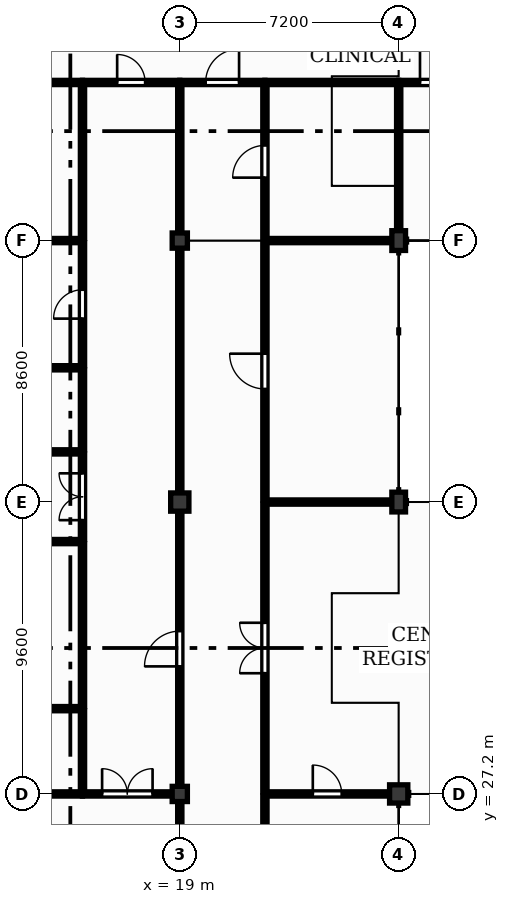
"""IFC4 building model, lengths in metres.
Left out: names, types, materials, properties, quantities, classifications, styles, units other than length and angle.
Written with IfcOpenShell. Run it as: python <this file> out.ifc"""

import sys

from ifc_helpers import new_model, si_unit, direction, frame, frame_2d, origin, origin_2d, place, context, subcontext, project, spatial, rectangle, extrude, element, fill, save


model = new_model("IFC4")
c1 = context("Model", 3, precision=1e-05, world=origin(), true_north=direction((0.0, 1.0)))
c2 = subcontext(c1, "Body", "Model", "MODEL_VIEW")
j1 = project(units=[si_unit("LENGTHUNIT", "METRE"), si_unit("PLANEANGLEUNIT", "RADIAN")], contexts=[c1])
p1 = place(None, origin())
s1 = spatial("IfcSite", under=j1, at=p1, CompositionType="ELEMENT")
p2 = place(p1, origin())
s2 = spatial("IfcBuilding", under=s1, at=p2, CompositionType="ELEMENT")
p3 = place(p2, origin())
s3 = spatial("IfcBuildingStorey", under=s2, at=p3, CompositionType="ELEMENT", Elevation=0.0)
p4 = place(p3, frame((19.0, 27.2, 0.0), z_axis=(0.0, 0.0, 1.0), x_axis=(1.0, 0.0, 0.0)))
e1 = element("IfcColumn", 1, at=p4, inside=s3, PredefinedType="COLUMN", context=c2, shape_type="SweptSolid", body=[
    extrude(rectangle(XDim=0.5, YDim=0.5, at=origin_2d()), origin(), (0.0, 0.0, 1.0), 4.2),
])
p5 = place(p3, frame((19.0, 36.8, 0.0), z_axis=(0.0, 0.0, 1.0), x_axis=(1.0, 0.0, 0.0)))
e2 = element("IfcColumn", 2, at=p5, inside=s3, PredefinedType="COLUMN", context=c2, shape_type="SweptSolid", body=[
    extrude(rectangle(XDim=0.6, YDim=0.6, at=origin_2d()), origin(), (0.0, 0.0, 1.0), 4.2),
])
p6 = place(p3, frame((19.0, 45.4, 0.0), z_axis=(0.0, 0.0, 1.0), x_axis=(1.0, 0.0, 0.0)))
e3 = element("IfcColumn", 3, at=p6, inside=s3, PredefinedType="COLUMN", context=c2, shape_type="SweptSolid", body=[
    extrude(rectangle(XDim=0.5, YDim=0.5, at=origin_2d()), origin(), (0.0, 0.0, 1.0), 4.2),
])
p7 = place(p3, frame((26.2, 27.2, 0.0), z_axis=(0.0, 0.0, 1.0), x_axis=(1.0, 0.0, 0.0)))
e4 = element("IfcColumn", 4, at=p7, inside=s3, PredefinedType="COLUMN", context=c2, shape_type="SweptSolid", body=[
    extrude(rectangle(XDim=0.6, YDim=0.6, at=origin_2d()), origin(), (0.0, 0.0, 1.0), 4.2),
])
for number, where, z_axis, x_axis in (
    (5, (26.2, 36.8, 0.0), (0.0, 0.0, 1.0), (1.0, 0.0, 0.0)),
    (6, (26.2, 45.4, 0.0), (0.0, 0.0, 1.0), (1.0, 0.0, 0.0)),
):
    element("IfcColumn", number, at=place(p3, frame(where, z_axis=z_axis, x_axis=x_axis)), inside=s3, PredefinedType="COLUMN", context=c2, shape_type="SweptSolid", body=[
        extrude(rectangle(XDim=0.45, YDim=0.65, at=origin_2d()), origin(), (0.0, 0.0, 1.0), 4.2),
    ])
p8 = place(p3, frame((12.025, 27.2, 0.0), z_axis=(0.0, 0.0, 1.0), x_axis=(1.0, 0.0, 0.0)))
e7 = element("IfcWall", 7, at=p8, inside=s3, PredefinedType="PARTITIONING", context=c2, shape_type="SweptSolid", body=[
    extrude(rectangle(XDim=3.775, YDim=0.14, at=frame_2d((1.888, 0.0))), origin(), (0.0, 0.0, 1.0), 3.68),
])
p9 = place(p8, frame((1.357, 0.0, 0.0)))
e8 = element("IfcOpeningElement", 8, at=p9, cuts=e7, PredefinedType="OPENING", context=c2, shape_type="SweptSolid", body=[
    extrude(rectangle(XDim=1.06, YDim=2.15, at=frame_2d((0.53, 1.075))), frame((0.0, 0.08, 0.0), z_axis=(0.0, -1.0, 0.0), x_axis=(1.0, 0.0, 0.0)), (0.0, 0.0, 1.0), 0.16),
])
p10 = place(p3, frame((11.8, 30.005, 0.0), z_axis=(0.0, 0.0, 1.0), x_axis=(1.0, 0.0, 0.0)))
e9 = element("IfcWall", 9, at=p10, inside=s3, PredefinedType="PARTITIONING", context=c2, shape_type="SweptSolid", body=[
    extrude(rectangle(XDim=4.0, YDim=0.14, at=frame_2d((2.0, 0.0))), origin(), (0.0, 0.0, 1.0), 4.18),
])
p11 = place(p3, frame((11.8, 35.5, 0.0), z_axis=(0.0, 0.0, 1.0), x_axis=(1.0, 0.0, 0.0)))
e10 = element("IfcWall", 10, at=p11, inside=s3, PredefinedType="PARTITIONING", context=c2, shape_type="SweptSolid", body=[
    extrude(rectangle(XDim=4.0, YDim=0.14, at=frame_2d((2.0, 0.0))), origin(), (0.0, 0.0, 1.0), 4.18),
])
p12 = place(p11, frame((1.23, 0.0, 0.0)))
e11 = element("IfcOpeningElement", 11, at=p12, cuts=e10, PredefinedType="OPENING", context=c2, shape_type="SweptSolid", body=[
    extrude(rectangle(XDim=1.54, YDim=2.25, at=frame_2d((0.77, 1.125))), frame((0.0, 0.08, 0.0), z_axis=(0.0, -1.0, 0.0), x_axis=(1.0, 0.0, 0.0)), (0.0, 0.0, 1.0), 0.16),
])
p13 = place(p3, frame((11.8, 38.45, 0.0), z_axis=(0.0, 0.0, 1.0), x_axis=(1.0, 0.0, 0.0)))
e12 = element("IfcWall", 12, at=p13, inside=s3, PredefinedType="PARTITIONING", context=c2, shape_type="SweptSolid", body=[
    extrude(rectangle(XDim=4.0, YDim=0.14, at=frame_2d((2.0, 0.0))), origin(), (0.0, 0.0, 1.0), 4.18),
])
p14 = place(p13, frame((1.39, 0.0, 0.0)))
e13 = element("IfcOpeningElement", 13, at=p14, cuts=e12, PredefinedType="OPENING", context=c2, shape_type="SweptSolid", body=[
    extrude(rectangle(XDim=1.22, YDim=2.1, at=frame_2d((0.61, 1.05))), frame((0.0, 0.08, 0.0), z_axis=(0.0, -1.0, 0.0), x_axis=(1.0, 0.0, 0.0)), (0.0, 0.0, 1.0), 0.16),
])
p15 = place(p3, frame((11.8, 41.216, 0.0), z_axis=(0.0, 0.0, 1.0), x_axis=(1.0, 0.0, 0.0)))
e14 = element("IfcWall", 14, at=p15, inside=s3, PredefinedType="PARTITIONING", context=c2, shape_type="SweptSolid", body=[
    extrude(rectangle(XDim=4.0, YDim=0.14, at=frame_2d((2.0, 0.0))), origin(), (0.0, 0.0, 1.0), 4.18),
])
p16 = place(p3, frame((12.1, 45.4, 0.0), z_axis=(0.0, 0.0, 1.0), x_axis=(1.0, 0.0, 0.0)))
e15 = element("IfcWall", 15, at=p16, inside=s3, PredefinedType="PARTITIONING", context=c2, shape_type="SweptSolid", body=[
    extrude(rectangle(XDim=3.7, YDim=0.14, at=frame_2d((1.85, 0.0))), origin(), (0.0, 0.0, 1.0), 3.25),
])
p17 = place(p3, frame((11.8, 50.6, 0.0), z_axis=(0.0, 0.0, 1.0), x_axis=(1.0, 0.0, 0.0)))
e16 = element("IfcWall", 16, at=p17, inside=s3, PredefinedType="PARTITIONING", context=c2, shape_type="SweptSolid", body=[
    extrude(rectangle(XDim=4.0, YDim=0.14, at=frame_2d((2.0, 0.0))), origin(), (0.0, 0.0, 1.0), 4.18),
])
p18 = place(p17, frame((1.51, 0.0, 0.0)))
e17 = element("IfcOpeningElement", 17, at=p18, cuts=e16, PredefinedType="OPENING", context=c2, shape_type="SweptSolid", body=[
    extrude(rectangle(XDim=0.98, YDim=2.15, at=frame_2d((0.49, 1.075))), frame((0.0, 0.08, 0.0), z_axis=(0.0, -1.0, 0.0), x_axis=(1.0, 0.0, 0.0)), (0.0, 0.0, 1.0), 0.16),
])
p19 = place(p3, frame((15.8, 27.27, 0.0), z_axis=(0.0, 0.0, 1.0), x_axis=(0.0, 1.0, 0.0)))
e18 = element("IfcWall", 18, at=p19, inside=s3, PredefinedType="PARTITIONING", context=c2, shape_type="SweptSolid", body=[
    extrude(rectangle(XDim=2.665, YDim=0.14, at=frame_2d((1.333, 0.0))), origin(), (0.0, 0.0, 1.0), 4.18),
])
p20 = place(p3, frame((15.8, 27.2, 0.0), z_axis=(0.0, 0.0, 1.0), x_axis=(1.0, 0.0, 0.0)))
e19 = element("IfcWall", 19, at=p20, inside=s3, PredefinedType="PARTITIONING", context=c2, shape_type="SweptSolid", body=[
    extrude(rectangle(XDim=2.95, YDim=0.14, at=frame_2d((1.475, 0.0))), origin(), (0.0, 0.0, 1.0), 3.68),
])
p21 = place(p20, frame((0.645, 0.0, 0.0)))
e20 = element("IfcOpeningElement", 20, at=p21, cuts=e19, PredefinedType="OPENING", context=c2, shape_type="SweptSolid", body=[
    extrude(rectangle(XDim=1.66, YDim=2.3, at=frame_2d((0.83, 1.15))), frame((0.0, 0.08, 0.0), z_axis=(0.0, -1.0, 0.0), x_axis=(1.0, 0.0, 0.0)), (0.0, 0.0, 1.0), 0.16),
])
p22 = place(p3, frame((15.8, 30.075, 0.0), z_axis=(0.0, 0.0, 1.0), x_axis=(0.0, 1.0, 0.0)))
e21 = element("IfcWall", 21, at=p22, inside=s3, PredefinedType="PARTITIONING", context=c2, shape_type="SweptSolid", body=[
    extrude(rectangle(XDim=5.355, YDim=0.14, at=frame_2d((2.677, 0.0))), origin(), (0.0, 0.0, 1.0), 4.18),
])
p23 = place(p3, frame((15.8, 35.57, 0.0), z_axis=(0.0, 0.0, 1.0), x_axis=(0.0, 1.0, 0.0)))
e22 = element("IfcWall", 22, at=p23, inside=s3, PredefinedType="PARTITIONING", context=c2, shape_type="SweptSolid", body=[
    extrude(rectangle(XDim=2.81, YDim=0.14, at=frame_2d((1.405, 0.0))), origin(), (0.0, 0.0, 1.0), 4.18),
])
p24 = place(p23, frame((0.635, 0.0, 0.0)))
e23 = element("IfcOpeningElement", 23, at=p24, cuts=e22, PredefinedType="OPENING", context=c2, shape_type="SweptSolid", body=[
    extrude(rectangle(XDim=1.54, YDim=2.25, at=frame_2d((0.77, 1.125))), frame((0.0, 0.08, 0.0), z_axis=(0.0, -1.0, 0.0), x_axis=(1.0, 0.0, 0.0)), (0.0, 0.0, 1.0), 0.16),
])
p25 = place(p3, frame((15.8, 38.52, 0.0), z_axis=(0.0, 0.0, 1.0), x_axis=(0.0, 1.0, 0.0)))
e24 = element("IfcWall", 24, at=p25, inside=s3, PredefinedType="PARTITIONING", context=c2, shape_type="SweptSolid", body=[
    extrude(rectangle(XDim=2.626, YDim=0.14, at=frame_2d((1.313, 0.0))), origin(), (0.0, 0.0, 1.0), 4.18),
])
p26 = place(p3, frame((15.8, 41.286, 0.0), z_axis=(0.0, 0.0, 1.0), x_axis=(0.0, 1.0, 0.0)))
e25 = element("IfcWall", 25, at=p26, inside=s3, PredefinedType="PARTITIONING", context=c2, shape_type="SweptSolid", body=[
    extrude(rectangle(XDim=4.044, YDim=0.14, at=frame_2d((2.022, 0.0))), origin(), (0.0, 0.0, 1.0), 4.18),
])
p27 = place(p26, frame((1.547, 0.0, 0.0)))
e26 = element("IfcOpeningElement", 26, at=p27, cuts=e25, PredefinedType="OPENING", context=c2, shape_type="SweptSolid", body=[
    extrude(rectangle(XDim=0.95, YDim=2.1, at=frame_2d((0.475, 1.05))), frame((0.0, 0.08, 0.0), z_axis=(0.0, -1.0, 0.0), x_axis=(1.0, 0.0, 0.0)), (0.0, 0.0, 1.0), 0.16),
])
p28 = place(p3, frame((15.8, 45.47, 0.0), z_axis=(0.0, 0.0, 1.0), x_axis=(0.0, 1.0, 0.0)))
e27 = element("IfcWall", 27, at=p28, inside=s3, PredefinedType="PARTITIONING", context=c2, shape_type="SweptSolid", body=[
    extrude(rectangle(XDim=5.06, YDim=0.14, at=frame_2d((2.53, 0.0))), origin(), (0.0, 0.0, 1.0), 4.18),
])
p29 = place(p3, frame((15.8, 50.6, 0.0), z_axis=(0.0, 0.0, 1.0), x_axis=(1.0, 0.0, 0.0)))
e28 = element("IfcWall", 28, at=p29, inside=s3, PredefinedType="PARTITIONING", context=c2, shape_type="SweptSolid", body=[
    extrude(rectangle(XDim=3.2, YDim=0.14, at=frame_2d((1.6, 0.0))), origin(), (0.0, 0.0, 1.0), 4.18),
])
p30 = place(p29, frame((1.14, 0.0, 0.0)))
e29 = element("IfcOpeningElement", 29, at=p30, cuts=e28, PredefinedType="OPENING", context=c2, shape_type="SweptSolid", body=[
    extrude(rectangle(XDim=0.92, YDim=2.1, at=frame_2d((0.46, 1.05))), frame((0.0, 0.08, 0.0), z_axis=(0.0, -1.0, 0.0), x_axis=(1.0, 0.0, 0.0)), (0.0, 0.0, 1.0), 0.16),
])
p31 = place(p3, frame((19.0, 18.85, 0.0), z_axis=(0.0, 0.0, 1.0), x_axis=(0.0, 1.0, 0.0)))
e30 = element("IfcWall", 30, at=p31, inside=s3, PredefinedType="PARTITIONING", context=c2, shape_type="SweptSolid", body=[
    extrude(rectangle(XDim=8.1, YDim=0.14, at=frame_2d((4.05, 0.0))), origin(), (0.0, 0.0, 1.0), 3.68),
])
p32 = place(p31, frame((3.47, 0.0, 0.0)))
e31 = element("IfcOpeningElement", 31, at=p32, cuts=e30, PredefinedType="OPENING", context=c2, shape_type="SweptSolid", body=[
    extrude(rectangle(XDim=1.16, YDim=2.1, at=frame_2d((0.58, 1.05))), frame((0.0, 0.08, 0.0), z_axis=(0.0, -1.0, 0.0), x_axis=(1.0, 0.0, 0.0)), (0.0, 0.0, 1.0), 0.16),
])
p33 = place(p3, frame((19.0, 27.45, 0.0), z_axis=(0.0, 0.0, 1.0), x_axis=(0.0, 1.0, 0.0)))
e32 = element("IfcWall", 32, at=p33, inside=s3, PredefinedType="PARTITIONING", context=c2, shape_type="SweptSolid", body=[
    extrude(rectangle(XDim=9.05, YDim=0.14, at=frame_2d((4.525, 0.0))), origin(), (0.0, 0.0, 1.0), 3.4),
])
p34 = place(p33, frame((3.945, 0.0, 0.0)))
e33 = element("IfcOpeningElement", 33, at=p34, cuts=e32, PredefinedType="OPENING", context=c2, shape_type="SweptSolid", body=[
    extrude(rectangle(XDim=1.16, YDim=2.1, at=frame_2d((0.58, 1.05))), frame((0.0, 0.08, 0.0), z_axis=(0.0, -1.0, 0.0), x_axis=(1.0, 0.0, 0.0)), (0.0, 0.0, 1.0), 0.16),
])
p35 = place(p3, frame((19.0, 37.1, 0.0), z_axis=(0.0, 0.0, 1.0), x_axis=(0.0, 1.0, 0.0)))
e34 = element("IfcWall", 34, at=p35, inside=s3, PredefinedType="PARTITIONING", context=c2, shape_type="SweptSolid", body=[
    extrude(rectangle(XDim=8.05, YDim=0.14, at=frame_2d((4.025, 0.0))), origin(), (0.0, 0.0, 1.0), 3.4),
])
p36 = place(p3, frame((19.0, 45.65, 0.0), z_axis=(0.0, 0.0, 1.0), x_axis=(0.0, 1.0, 0.0)))
e35 = element("IfcWall", 35, at=p36, inside=s3, PredefinedType="PARTITIONING", context=c2, shape_type="SweptSolid", body=[
    extrude(rectangle(XDim=4.88, YDim=0.14, at=frame_2d((2.44, 0.0))), origin(), (0.0, 0.0, 1.0), 3.5),
])
p37 = place(p3, frame((19.0, 50.6, 0.0), z_axis=(0.0, 0.0, 1.0), x_axis=(1.0, 0.0, 0.0)))
e36 = element("IfcWall", 36, at=p37, inside=s3, PredefinedType="PARTITIONING", context=c2, shape_type="SweptSolid", body=[
    extrude(rectangle(XDim=2.8, YDim=0.14, at=frame_2d((1.4, 0.0))), origin(), (0.0, 0.0, 1.0), 4.18),
])
p38 = place(p37, frame((0.85, 0.0, 0.0)))
e37 = element("IfcOpeningElement", 37, at=p38, cuts=e36, PredefinedType="OPENING", context=c2, shape_type="SweptSolid", body=[
    extrude(rectangle(XDim=1.1, YDim=2.1, at=frame_2d((0.55, 1.05))), frame((0.0, 0.08, 0.0), z_axis=(0.0, -1.0, 0.0), x_axis=(1.0, 0.0, 0.0)), (0.0, 0.0, 1.0), 0.16),
])
p39 = place(p3, frame((21.8, 18.67, 0.0), z_axis=(0.0, 0.0, 1.0), x_axis=(0.0, 1.0, 0.0)))
e38 = element("IfcWall", 38, at=p39, inside=s3, PredefinedType="PARTITIONING", context=c2, shape_type="SweptSolid", body=[
    extrude(rectangle(XDim=8.46, YDim=0.14, at=frame_2d((4.23, 0.0))), origin(), (0.0, 0.0, 1.0), 4.18),
])
p40 = place(p39, frame((3.46, 0.0, 0.0)))
e39 = element("IfcOpeningElement", 39, at=p40, cuts=e38, PredefinedType="OPENING", context=c2, shape_type="SweptSolid", body=[
    extrude(rectangle(XDim=1.54, YDim=2.25, at=frame_2d((0.77, 1.125))), frame((0.0, 0.08, 0.0), z_axis=(0.0, -1.0, 0.0), x_axis=(1.0, 0.0, 0.0)), (0.0, 0.0, 1.0), 0.16),
])
p41 = place(p3, frame((21.8, 27.27, 0.0), z_axis=(0.0, 0.0, 1.0), x_axis=(0.0, 1.0, 0.0)))
e40 = element("IfcWall", 40, at=p41, inside=s3, PredefinedType="PARTITIONING", context=c2, shape_type="SweptSolid", body=[
    extrude(rectangle(XDim=9.46, YDim=0.14, at=frame_2d((4.73, 0.0))), origin(), (0.0, 0.0, 1.0), 4.18),
])
p42 = place(p41, frame((3.9, 0.0, 0.0)))
e41 = element("IfcOpeningElement", 41, at=p42, cuts=e40, PredefinedType="OPENING", context=c2, shape_type="SweptSolid", body=[
    extrude(rectangle(XDim=1.66, YDim=2.3, at=frame_2d((0.83, 1.15))), frame((0.0, 0.08, 0.0), z_axis=(0.0, -1.0, 0.0), x_axis=(1.0, 0.0, 0.0)), (0.0, 0.0, 1.0), 0.16),
])
p43 = place(p3, frame((21.8, 27.2, 0.0), z_axis=(0.0, 0.0, 1.0), x_axis=(1.0, 0.0, 0.0)))
e42 = element("IfcWall", 42, at=p43, inside=s3, PredefinedType="PARTITIONING", context=c2, shape_type="SweptSolid", body=[
    extrude(rectangle(XDim=4.1, YDim=0.14, at=frame_2d((2.05, 0.0))), origin(), (0.0, 0.0, 1.0), 3.6),
])
p44 = place(p43, frame((1.575, 0.0, 0.0)))
e43 = element("IfcOpeningElement", 43, at=p44, cuts=e42, PredefinedType="OPENING", context=c2, shape_type="SweptSolid", body=[
    extrude(rectangle(XDim=0.95, YDim=2.1, at=frame_2d((0.475, 1.05))), frame((0.0, 0.08, 0.0), z_axis=(0.0, -1.0, 0.0), x_axis=(1.0, 0.0, 0.0)), (0.0, 0.0, 1.0), 0.16),
])
p45 = place(p3, frame((21.8, 36.87, 0.0), z_axis=(0.0, 0.0, 1.0), x_axis=(0.0, 1.0, 0.0)))
e44 = element("IfcWall", 44, at=p45, inside=s3, PredefinedType="PARTITIONING", context=c2, shape_type="SweptSolid", body=[
    extrude(rectangle(XDim=8.46, YDim=0.14, at=frame_2d((4.23, 0.0))), origin(), (0.0, 0.0, 1.0), 4.18),
])
p46 = place(p45, frame((3.65, 0.0, 0.0)))
e45 = element("IfcOpeningElement", 45, at=p46, cuts=e44, PredefinedType="OPENING", context=c2, shape_type="SweptSolid", body=[
    extrude(rectangle(XDim=1.16, YDim=2.1, at=frame_2d((0.58, 1.05))), frame((0.0, 0.08, 0.0), z_axis=(0.0, -1.0, 0.0), x_axis=(1.0, 0.0, 0.0)), (0.0, 0.0, 1.0), 0.16),
])
p47 = place(p3, frame((21.8, 36.8, 0.0), z_axis=(0.0, 0.0, 1.0), x_axis=(1.0, 0.0, 0.0)))
e46 = element("IfcWall", 46, at=p47, inside=s3, PredefinedType="PARTITIONING", context=c2, shape_type="SweptSolid", body=[
    extrude(rectangle(XDim=4.175, YDim=0.14, at=frame_2d((2.087, 0.0))), origin(), (0.0, 0.0, 1.0), 3.5),
])
p48 = place(p3, frame((21.8, 45.47, 0.0), z_axis=(0.0, 0.0, 1.0), x_axis=(0.0, 1.0, 0.0)))
e47 = element("IfcWall", 47, at=p48, inside=s3, PredefinedType="PARTITIONING", context=c2, shape_type="SweptSolid", body=[
    extrude(rectangle(XDim=5.06, YDim=0.14, at=frame_2d((2.53, 0.0))), origin(), (0.0, 0.0, 1.0), 4.18),
])
p49 = place(p48, frame((2.0, 0.0, 0.0)))
e48 = element("IfcOpeningElement", 48, at=p49, cuts=e47, PredefinedType="OPENING", context=c2, shape_type="SweptSolid", body=[
    extrude(rectangle(XDim=1.06, YDim=2.15, at=frame_2d((0.53, 1.075))), frame((0.0, 0.08, 0.0), z_axis=(0.0, -1.0, 0.0), x_axis=(1.0, 0.0, 0.0)), (0.0, 0.0, 1.0), 0.16),
])
p50 = place(p3, frame((21.8, 45.4, 0.0), z_axis=(0.0, 0.0, 1.0), x_axis=(1.0, 0.0, 0.0)))
e49 = element("IfcWall", 49, at=p50, inside=s3, PredefinedType="PARTITIONING", context=c2, shape_type="SweptSolid", body=[
    extrude(rectangle(XDim=4.175, YDim=0.14, at=frame_2d((2.087, 0.0))), origin(), (0.0, 0.0, 1.0), 3.25),
])
p51 = place(p3, frame((21.8, 50.6, 0.0), z_axis=(0.0, 0.0, 1.0), x_axis=(1.0, 0.0, 0.0)))
e50 = element("IfcWall", 50, at=p51, inside=s3, PredefinedType="PARTITIONING", context=c2, shape_type="SweptSolid", body=[
    extrude(rectangle(XDim=4.4, YDim=0.14, at=frame_2d((2.2, 0.0))), origin(), (0.0, 0.0, 1.0), 4.18),
])
p52 = place(p3, frame((26.2, 45.725, 0.0), z_axis=(0.0, 0.0, 1.0), x_axis=(0.0, 1.0, 0.0)))
e51 = element("IfcWall", 51, at=p52, inside=s3, PredefinedType="PARTITIONING", context=c2, shape_type="SweptSolid", body=[
    extrude(rectangle(XDim=4.805, YDim=0.14, at=frame_2d((2.402, 0.0))), origin(), (0.0, 0.0, 1.0), 3.5),
])
p53 = place(p3, frame((26.2, 50.6, 0.0), z_axis=(0.0, 0.0, 1.0), x_axis=(1.0, 0.0, 0.0)))
e52 = element("IfcWall", 52, at=p53, inside=s3, PredefinedType="PARTITIONING", context=c2, shape_type="SweptSolid", body=[
    extrude(rectangle(XDim=2.621, YDim=0.14, at=frame_2d((1.311, 0.0))), origin(), (0.0, 0.0, 1.0), 4.18),
])
p54 = place(p53, frame((0.7, 0.0, 0.0)))
e53 = element("IfcOpeningElement", 53, at=p54, cuts=e52, PredefinedType="OPENING", context=c2, shape_type="SweptSolid", body=[
    extrude(rectangle(XDim=1.22, YDim=2.1, at=frame_2d((0.61, 1.05))), frame((0.0, 0.08, 0.0), z_axis=(0.0, -1.0, 0.0), x_axis=(1.0, 0.0, 0.0)), (0.0, 0.0, 1.0), 0.16),
])
p55 = place(p30, origin())
e54 = element("IfcDoor", 54, at=p55, inside=s3, OperationType="SINGLE_SWING_LEFT", PredefinedType="DOOR", context=c2, shape_type="SweptSolid", body=[
    extrude(rectangle(XDim=0.92, YDim=2.1, at=frame_2d((0.46, 1.05))), frame((0.0, 0.025, 0.0), z_axis=(0.0, -1.0, 0.0), x_axis=(1.0, 0.0, 0.0)), (0.0, 0.0, 1.0), 0.05),
])
fill(e29, e54)
p56 = place(p38, origin())
e55 = element("IfcDoor", 55, at=p56, inside=s3, OperationType="SINGLE_SWING_RIGHT", PredefinedType="DOOR", context=c2, shape_type="SweptSolid", body=[
    extrude(rectangle(XDim=1.1, YDim=2.1, at=frame_2d((0.55, 1.05))), frame((0.0, 0.025, 0.0), z_axis=(0.0, -1.0, 0.0), x_axis=(1.0, 0.0, 0.0)), (0.0, 0.0, 1.0), 0.05),
])
fill(e37, e55)
p57 = place(p24, origin())
e56 = element("IfcDoor", 56, at=p57, inside=s3, OperationType="DOUBLE_DOOR_SINGLE_SWING", PredefinedType="DOOR", context=c2, shape_type="SweptSolid", body=[
    extrude(rectangle(XDim=1.54, YDim=2.25, at=frame_2d((0.77, 1.125))), frame((0.0, 0.025, 0.0), z_axis=(0.0, -1.0, 0.0), x_axis=(1.0, 0.0, 0.0)), (0.0, 0.0, 1.0), 0.05),
])
fill(e23, e56)
p58 = place(p34, origin())
e57 = element("IfcDoor", 57, at=p58, inside=s3, OperationType="SINGLE_SWING_LEFT", PredefinedType="DOOR", context=c2, shape_type="SweptSolid", body=[
    extrude(rectangle(XDim=1.16, YDim=2.1, at=frame_2d((0.58, 1.05))), frame((0.0, 0.025, 0.0), z_axis=(0.0, -1.0, 0.0), x_axis=(1.0, 0.0, 0.0)), (0.0, 0.0, 1.0), 0.05),
])
fill(e33, e57)
p59 = place(p21, origin())
e58 = element("IfcDoor", 58, at=p59, inside=s3, OperationType="DOUBLE_DOOR_SINGLE_SWING", PredefinedType="DOOR", context=c2, shape_type="SweptSolid", body=[
    extrude(rectangle(XDim=1.66, YDim=2.3, at=frame_2d((0.83, 1.15))), frame((0.0, 0.025, 0.0), z_axis=(0.0, -1.0, 0.0), x_axis=(1.0, 0.0, 0.0)), (0.0, 0.0, 1.0), 0.05),
])
fill(e20, e58)
p60 = place(p42, origin())
e59 = element("IfcDoor", 59, at=p60, inside=s3, OperationType="DOUBLE_DOOR_SINGLE_SWING", PredefinedType="DOOR", context=c2, shape_type="SweptSolid", body=[
    extrude(rectangle(XDim=1.66, YDim=2.3, at=frame_2d((0.83, 1.15))), frame((0.0, 0.025, 0.0), z_axis=(0.0, -1.0, 0.0), x_axis=(1.0, 0.0, 0.0)), (0.0, 0.0, 1.0), 0.05),
])
fill(e41, e59)
p61 = place(p44, origin())
e60 = element("IfcDoor", 60, at=p61, inside=s3, OperationType="SINGLE_SWING_LEFT", PredefinedType="DOOR", context=c2, shape_type="SweptSolid", body=[
    extrude(rectangle(XDim=0.95, YDim=2.1, at=frame_2d((0.475, 1.05))), frame((0.0, 0.025, 0.0), z_axis=(0.0, -1.0, 0.0), x_axis=(1.0, 0.0, 0.0)), (0.0, 0.0, 1.0), 0.05),
])
fill(e43, e60)
p62 = place(p46, origin())
e61 = element("IfcDoor", 61, at=p62, inside=s3, OperationType="SINGLE_SWING_RIGHT", PredefinedType="DOOR", context=c2, shape_type="SweptSolid", body=[
    extrude(rectangle(XDim=1.16, YDim=2.1, at=frame_2d((0.58, 1.05))), frame((0.0, 0.025, 0.0), z_axis=(0.0, -1.0, 0.0), x_axis=(1.0, 0.0, 0.0)), (0.0, 0.0, 1.0), 0.05),
])
fill(e45, e61)
p63 = place(p27, origin())
e62 = element("IfcDoor", 62, at=p63, inside=s3, OperationType="SINGLE_SWING_LEFT", PredefinedType="DOOR", context=c2, shape_type="SweptSolid", body=[
    extrude(rectangle(XDim=0.95, YDim=2.1, at=frame_2d((0.475, 1.05))), frame((0.0, 0.025, 0.0), z_axis=(0.0, -1.0, 0.0), x_axis=(1.0, 0.0, 0.0)), (0.0, 0.0, 1.0), 0.05),
])
fill(e26, e62)
p64 = place(p49, origin())
e63 = element("IfcDoor", 63, at=p64, inside=s3, OperationType="SINGLE_SWING_LEFT", PredefinedType="DOOR", context=c2, shape_type="SweptSolid", body=[
    extrude(rectangle(XDim=1.06, YDim=2.15, at=frame_2d((0.53, 1.075))), frame((0.0, 0.025, 0.0), z_axis=(0.0, -1.0, 0.0), x_axis=(1.0, 0.0, 0.0)), (0.0, 0.0, 1.0), 0.05),
])
fill(e48, e63)
p65 = place(p54, origin())
e64 = element("IfcDoor", 64, at=p65, inside=s3, OperationType="SINGLE_SWING_LEFT", PredefinedType="DOOR", context=c2, shape_type="SweptSolid", body=[
    extrude(rectangle(XDim=1.22, YDim=2.1, at=frame_2d((0.61, 1.05))), frame((0.0, 0.025, 0.0), z_axis=(0.0, -1.0, 0.0), x_axis=(1.0, 0.0, 0.0)), (0.0, 0.0, 1.0), 0.05),
])
fill(e53, e64)
save(model, sys.argv[1])
